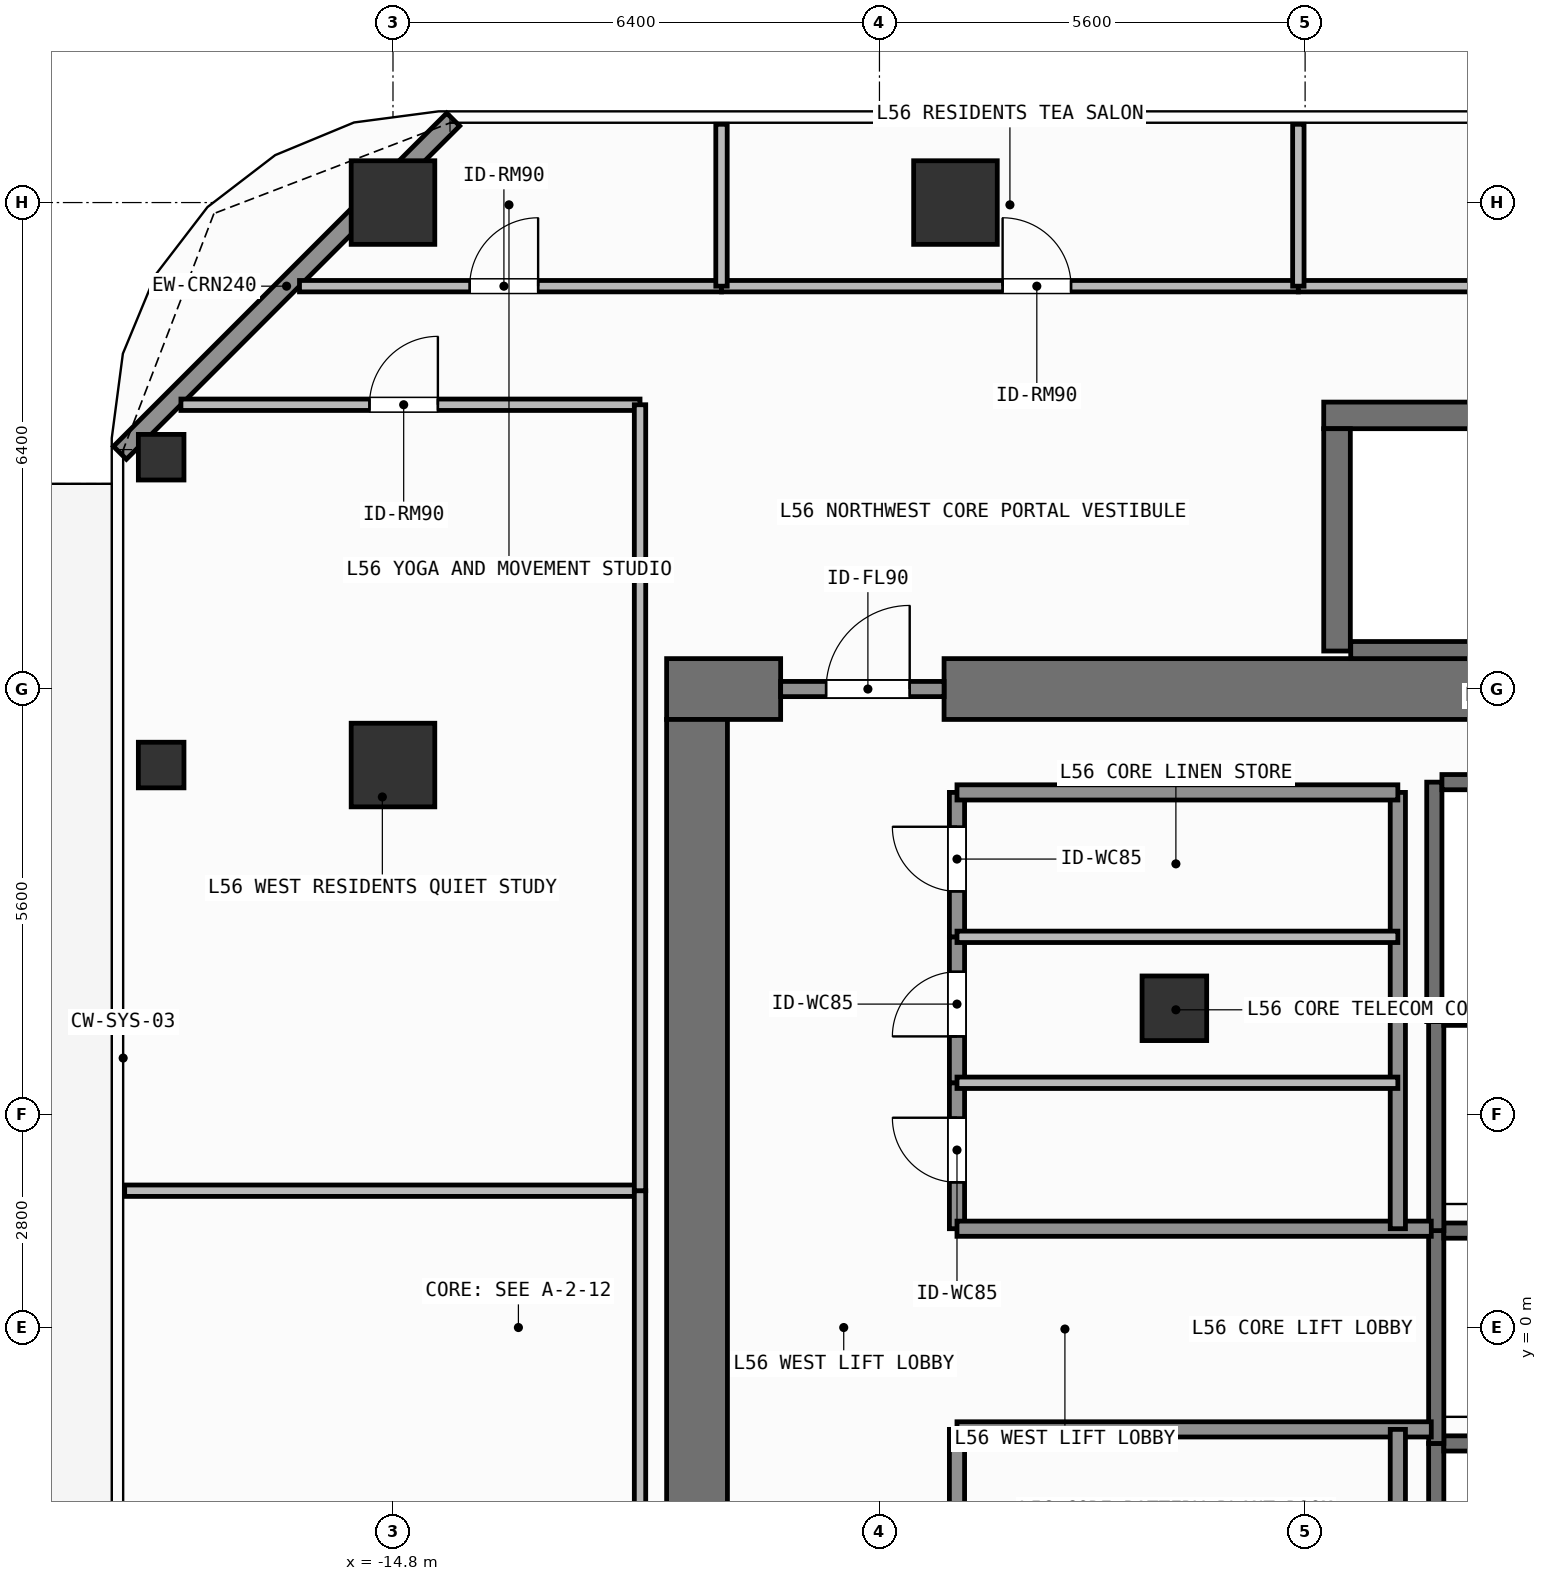
"""IFC4 building model, lengths in metres.
Left out: names, types, materials, properties, quantities, classifications, styles, units other than length and angle.
Written with IfcOpenShell. Run it as: python <this file> out.ifc"""

import sys

from ifc_helpers import new_model, si_unit, direction, frame, frame_2d, origin, origin_2d, place, context, subcontext, project, spatial, rectangle, hollow_rectangle, extrude, element, fill, save


model = new_model("IFC4")
c1 = context("Model", 3, precision=1e-05, world=origin(), true_north=direction((0.0, 1.0)))
c2 = subcontext(c1, "Body", "Model", "MODEL_VIEW")
j1 = project(units=[si_unit("LENGTHUNIT", "METRE"), si_unit("PLANEANGLEUNIT", "RADIAN")], contexts=[c1])
p1 = place(None, origin())
s1 = spatial("IfcSite", under=j1, at=p1, CompositionType="ELEMENT")
p2 = place(p1, origin())
s2 = spatial("IfcBuilding", under=s1, at=p2, CompositionType="ELEMENT")
p3 = place(p2, frame((0.0, 0.0, 227.4)))
s3 = spatial("IfcBuildingStorey", under=s2, at=p3, CompositionType="ELEMENT", Elevation=227.4)
p4 = place(p3, frame((-11.2, 8.4, 0.0), z_axis=(0.0, 0.0, 1.0), x_axis=(1.0, 0.0, 0.0)))
e1 = element("IfcWall", 1, at=p4, inside=s3, PredefinedType="SHEAR", context=c2, shape_type="SweptSolid", body=[
    extrude(rectangle(XDim=1.5, YDim=0.8, at=frame_2d((0.75, 0.0))), origin(), (0.0, 0.0, 1.0), 3.9),
])
p5 = place(p3, frame((-7.55, 8.4, 0.0), z_axis=(0.0, 0.0, 1.0), x_axis=(1.0, 0.0, 0.0)))
e2 = element("IfcWall", 2, at=p5, inside=s3, PredefinedType="SHEAR", context=c2, shape_type="SweptSolid", body=[
    extrude(rectangle(XDim=16.35, YDim=0.8, at=frame_2d((8.175, 0.0))), origin(), (0.0, 0.0, 1.0), 3.9),
])
p6 = place(p3, frame((-10.8, -8.0, 0.0), z_axis=(0.0, 0.0, 1.0), x_axis=(0.0, 1.0, 0.0)))
e3 = element("IfcWall", 3, at=p6, inside=s3, PredefinedType="SHEAR", context=c2, shape_type="SweptSolid", body=[
    extrude(rectangle(XDim=16.0, YDim=0.8, at=frame_2d((8.0, 0.0))), origin(), (0.0, 0.0, 1.0), 3.9),
])
p7 = place(p3, frame((-2.555, 12.0, 0.0), z_axis=(0.0, 0.0, 1.0), x_axis=(1.0, 0.0, 0.0)))
e4 = element("IfcWall", 4, at=p7, inside=s3, PredefinedType="SHEAR", context=c2, shape_type="SweptSolid", body=[
    extrude(rectangle(XDim=7.31, YDim=0.35, at=frame_2d((3.655, 0.0))), origin(), (0.0, 0.0, 1.0), 3.9),
])
p8 = place(p3, frame((-2.2, 8.913, 0.0), z_axis=(0.0, 0.0, 1.0), x_axis=(1.0, 0.0, 0.0)))
e5 = element("IfcWall", 5, at=p8, inside=s3, PredefinedType="SHEAR", context=c2, shape_type="SweptSolid", body=[
    extrude(rectangle(XDim=6.6, YDim=0.225, at=frame_2d((3.3, 0.0))), origin(), (0.0, 0.0, 1.0), 3.9),
])
p9 = place(p3, frame((-2.38, 8.9, 0.0), z_axis=(0.0, 0.0, 1.0), x_axis=(0.0, 1.0, 0.0)))
e6 = element("IfcWall", 6, at=p9, inside=s3, PredefinedType="SHEAR", context=c2, shape_type="SweptSolid", body=[
    extrude(rectangle(XDim=2.925, YDim=0.35, at=frame_2d((1.462, 0.0))), origin(), (0.0, 0.0, 1.0), 3.9),
])
for number, where, z_axis, x_axis in (
    (7, (-14.8, 14.8, 0.0), (0.0, 0.0, 1.0), (1.0, 0.0, 0.0)),
    (8, (-7.4, 14.8, 0.0), (0.0, 0.0, 1.0), (1.0, 0.0, 0.0)),
    (9, (-14.8, 7.4, 0.0), (0.0, 0.0, 1.0), (1.0, 0.0, 0.0)),
):
    element("IfcColumn", number, at=place(p3, frame(where, z_axis=z_axis, x_axis=x_axis)), inside=s3, PredefinedType="COLUMN", context=c2, shape_type="SweptSolid", body=[
        extrude(rectangle(XDim=1.1, YDim=1.1, at=origin_2d()), origin(), (0.0, 0.0, 1.0), 3.9),
    ])
p10 = place(p3, frame((-4.52, 4.2, 0.0), z_axis=(0.0, 0.0, 1.0), x_axis=(1.0, 0.0, 0.0)))
e10 = element("IfcColumn", 10, at=p10, inside=s3, PredefinedType="COLUMN", context=c2, shape_type="SweptSolid", body=[
    extrude(rectangle(XDim=0.85, YDim=0.85, at=origin_2d()), origin(), (0.0, 0.0, 1.0), 3.9),
])
for number, where, z_axis, x_axis in (
    (11, (-17.85, 11.45, 0.0), (0.0, 0.0, 1.0), (1.0, 0.0, 0.0)),
    (12, (-17.85, 7.4, 0.0), (0.0, 0.0, 1.0), (1.0, 0.0, 0.0)),
):
    element("IfcColumn", number, at=place(p3, frame(where, z_axis=z_axis, x_axis=x_axis)), inside=s3, PredefinedType="COLUMN", context=c2, shape_type="SweptSolid", body=[
        extrude(hollow_rectangle(XDim=0.6, YDim=0.6, WallThickness=0.028, at=origin_2d()), origin(), (0.0, 0.0, 1.0), 3.9),
    ])
p11 = place(p3, frame((-18.392, 11.508, 0.0), z_axis=(0.0, 0.0, 1.0), x_axis=(0.707106781187, 0.707106781187, 0.0)))
e13 = element("IfcWall", 13, at=p11, inside=s3, PredefinedType="SOLIDWALL", context=c2, shape_type="SweptSolid", body=[
    extrude(rectangle(XDim=6.201, YDim=0.24, at=frame_2d((3.101, 0.0))), origin(), (0.0, 0.0, 1.0), 3.68),
])
p12 = place(p3, frame((-1.075, -4.275, 0.0), z_axis=(0.0, 0.0, 1.0), x_axis=(0.0, 1.0, 0.0)))
e14 = element("IfcWall", 14, at=p12, inside=s3, PredefinedType="SHEAR", context=c2, shape_type="SweptSolid", body=[
    extrude(rectangle(XDim=2.75, YDim=0.2, at=frame_2d((1.375, 0.0))), origin(), (0.0, 0.0, 1.0), 3.68),
])
p13 = place(p3, frame((-0.975, -1.525, 0.0), z_axis=(0.0, 0.0, 1.0), x_axis=(1.0, 0.0, 0.0)))
e15 = element("IfcWall", 15, at=p13, inside=s3, PredefinedType="SHEAR", context=c2, shape_type="SweptSolid", body=[
    extrude(rectangle(XDim=2.35, YDim=0.2, at=frame_2d((1.175, 0.0))), origin(), (0.0, 0.0, 1.0), 3.68),
])
p14 = place(p3, frame((-1.075, -1.525, 0.0), z_axis=(0.0, 0.0, 1.0), x_axis=(0.0, 1.0, 0.0)))
e16 = element("IfcWall", 16, at=p14, inside=s3, PredefinedType="SHEAR", context=c2, shape_type="SweptSolid", body=[
    extrude(rectangle(XDim=2.8, YDim=0.2, at=frame_2d((1.4, 0.0))), origin(), (0.0, 0.0, 1.0), 3.68),
])
p15 = place(p3, frame((-0.975, 1.275, 0.0), z_axis=(0.0, 0.0, 1.0), x_axis=(1.0, 0.0, 0.0)))
e17 = element("IfcWall", 17, at=p15, inside=s3, PredefinedType="SHEAR", context=c2, shape_type="SweptSolid", body=[
    extrude(rectangle(XDim=2.35, YDim=0.2, at=frame_2d((1.175, 0.0))), origin(), (0.0, 0.0, 1.0), 3.68),
])
p16 = place(p3, frame((-1.075, 1.275, 0.0), z_axis=(0.0, 0.0, 1.0), x_axis=(0.0, 1.0, 0.0)))
e18 = element("IfcWall", 18, at=p16, inside=s3, PredefinedType="SHEAR", context=c2, shape_type="SweptSolid", body=[
    extrude(rectangle(XDim=2.8, YDim=0.2, at=frame_2d((1.4, 0.0))), origin(), (0.0, 0.0, 1.0), 3.68),
])
p17 = place(p3, frame((-0.975, 4.075, 0.0), z_axis=(0.0, 0.0, 1.0), x_axis=(1.0, 0.0, 0.0)))
e19 = element("IfcWall", 19, at=p17, inside=s3, PredefinedType="SHEAR", context=c2, shape_type="SweptSolid", body=[
    extrude(rectangle(XDim=2.35, YDim=0.2, at=frame_2d((1.175, 0.0))), origin(), (0.0, 0.0, 1.0), 3.68),
])
p18 = place(p3, frame((-1.1, 4.025, 0.0), z_axis=(0.0, 0.0, 1.0), x_axis=(0.0, 1.0, 0.0)))
e20 = element("IfcWall", 20, at=p18, inside=s3, PredefinedType="SHEAR", context=c2, shape_type="SweptSolid", body=[
    extrude(rectangle(XDim=3.15, YDim=0.2, at=frame_2d((1.575, 0.0))), origin(), (0.0, 0.0, 1.0), 3.68),
])
p19 = place(p3, frame((-1.0, 7.175, 0.0), z_axis=(0.0, 0.0, 1.0), x_axis=(1.0, 0.0, 0.0)))
e21 = element("IfcWall", 21, at=p19, inside=s3, PredefinedType="SHEAR", context=c2, shape_type="SweptSolid", body=[
    extrude(rectangle(XDim=2.4, YDim=0.2, at=frame_2d((1.2, 0.0))), origin(), (0.0, 0.0, 1.0), 3.68),
])
p20 = place(p3, frame((-9.7, 8.4, 0.0), z_axis=(0.0, 0.0, 1.0), x_axis=(1.0, 0.0, 0.0)))
e22 = element("IfcWall", 22, at=p20, inside=s3, PredefinedType="SOLIDWALL", context=c2, shape_type="SweptSolid", body=[
    extrude(rectangle(XDim=2.15, YDim=0.2, at=frame_2d((1.075, 0.0))), origin(), (0.0, 0.0, 1.0), 2.82),
])
p21 = place(p20, frame((0.598, 0.0, 0.0)))
e23 = element("IfcOpeningElement", 23, at=p21, cuts=e22, PredefinedType="OPENING", context=c2, shape_type="SweptSolid", body=[
    extrude(rectangle(XDim=1.1, YDim=2.15, at=frame_2d((0.55, 1.075))), frame((0.0, 0.11, 0.0), z_axis=(0.0, -1.0, 0.0), x_axis=(1.0, 0.0, 0.0)), (0.0, 0.0, 1.0), 0.22),
])
p22 = place(p3, frame((-7.38, -7.04, 0.0), z_axis=(0.0, 0.0, 1.0), x_axis=(0.0, 1.0, 0.0)))
e24 = element("IfcWall", 24, at=p22, inside=s3, PredefinedType="SOLIDWALL", context=c2, shape_type="SweptSolid", body=[
    extrude(rectangle(XDim=5.7, YDim=0.2, at=frame_2d((2.85, 0.0))), origin(), (0.0, 0.0, 1.0), 3.68),
])
p23 = place(p22, frame((2.301, 0.0, 0.0)))
e25 = element("IfcOpeningElement", 25, at=p23, cuts=e24, PredefinedType="OPENING", context=c2, shape_type="SweptSolid", body=[
    extrude(rectangle(XDim=0.92, YDim=2.1, at=frame_2d((0.46, 1.05))), frame((0.0, 0.11, 0.0), z_axis=(0.0, -1.0, 0.0), x_axis=(1.0, 0.0, 0.0)), (0.0, 0.0, 1.0), 0.22),
])
p24 = place(p3, frame((-7.38, 1.3, 0.0), z_axis=(0.0, 0.0, 1.0), x_axis=(0.0, 1.0, 0.0)))
e26 = element("IfcWall", 26, at=p24, inside=s3, PredefinedType="SOLIDWALL", context=c2, shape_type="SweptSolid", body=[
    extrude(rectangle(XDim=1.92, YDim=0.2, at=frame_2d((0.96, 0.0))), origin(), (0.0, 0.0, 1.0), 3.68),
])
p25 = place(p24, frame((0.61, 0.0, 0.0)))
e27 = element("IfcOpeningElement", 27, at=p25, cuts=e26, PredefinedType="OPENING", context=c2, shape_type="SweptSolid", body=[
    extrude(rectangle(XDim=0.85, YDim=2.1, at=frame_2d((0.425, 1.05))), frame((0.0, 0.11, 0.0), z_axis=(0.0, -1.0, 0.0), x_axis=(1.0, 0.0, 0.0)), (0.0, 0.0, 1.0), 0.22),
])
p26 = place(p3, frame((-7.38, 3.22, 0.0), z_axis=(0.0, 0.0, 1.0), x_axis=(0.0, 1.0, 0.0)))
e28 = element("IfcWall", 28, at=p26, inside=s3, PredefinedType="SOLIDWALL", context=c2, shape_type="SweptSolid", body=[
    extrude(rectangle(XDim=1.92, YDim=0.2, at=frame_2d((0.96, 0.0))), origin(), (0.0, 0.0, 1.0), 3.68),
])
p27 = place(p26, frame((0.61, 0.0, 0.0)))
e29 = element("IfcOpeningElement", 29, at=p27, cuts=e28, PredefinedType="OPENING", context=c2, shape_type="SweptSolid", body=[
    extrude(rectangle(XDim=0.85, YDim=2.1, at=frame_2d((0.425, 1.05))), frame((0.0, 0.11, 0.0), z_axis=(0.0, -1.0, 0.0), x_axis=(1.0, 0.0, 0.0)), (0.0, 0.0, 1.0), 0.22),
])
p28 = place(p3, frame((-7.38, 5.14, 0.0), z_axis=(0.0, 0.0, 1.0), x_axis=(0.0, 1.0, 0.0)))
e30 = element("IfcWall", 30, at=p28, inside=s3, PredefinedType="SOLIDWALL", context=c2, shape_type="SweptSolid", body=[
    extrude(rectangle(XDim=1.9, YDim=0.2, at=frame_2d((0.95, 0.0))), origin(), (0.0, 0.0, 1.0), 3.68),
])
p29 = place(p28, frame((0.598, 0.0, 0.0)))
e31 = element("IfcOpeningElement", 31, at=p29, cuts=e30, PredefinedType="OPENING", context=c2, shape_type="SweptSolid", body=[
    extrude(rectangle(XDim=0.85, YDim=2.1, at=frame_2d((0.425, 1.05))), frame((0.0, 0.11, 0.0), z_axis=(0.0, -1.0, 0.0), x_axis=(1.0, 0.0, 0.0)), (0.0, 0.0, 1.0), 0.22),
])
p30 = place(p3, frame((-16.03, 13.7, 0.0), z_axis=(0.0, 0.0, 1.0), x_axis=(1.0, 0.0, 0.0)))
e32 = element("IfcWall", 32, at=p30, inside=s3, PredefinedType="PARTITIONING", context=c2, shape_type="SweptSolid", body=[
    extrude(rectangle(XDim=5.552, YDim=0.15, at=frame_2d((2.776, 0.0))), origin(), (0.0, 0.0, 1.0), 3.68),
])
p31 = place(p30, frame((2.24, 0.0, 0.0)))
e33 = element("IfcOpeningElement", 33, at=p31, cuts=e32, PredefinedType="OPENING", context=c2, shape_type="SweptSolid", body=[
    extrude(rectangle(XDim=0.9, YDim=2.1, at=frame_2d((0.45, 1.05))), frame((0.0, 0.085, 0.0), z_axis=(0.0, -1.0, 0.0), x_axis=(1.0, 0.0, 0.0)), (0.0, 0.0, 1.0), 0.17),
])
p32 = place(p3, frame((-10.478, 13.7, 0.0), z_axis=(0.0, 0.0, 1.0), x_axis=(1.0, 0.0, 0.0)))
e34 = element("IfcWall", 34, at=p32, inside=s3, PredefinedType="PARTITIONING", context=c2, shape_type="SweptSolid", body=[
    extrude(rectangle(XDim=7.589, YDim=0.15, at=frame_2d((3.794, 0.0))), origin(), (0.0, 0.0, 1.0), 3.68),
])
p33 = place(p32, frame((3.698, 0.0, 0.0)))
e35 = element("IfcOpeningElement", 35, at=p33, cuts=e34, PredefinedType="OPENING", context=c2, shape_type="SweptSolid", body=[
    extrude(rectangle(XDim=0.9, YDim=2.1, at=frame_2d((0.45, 1.05))), frame((0.0, 0.085, 0.0), z_axis=(0.0, -1.0, 0.0), x_axis=(1.0, 0.0, 0.0)), (0.0, 0.0, 1.0), 0.17),
])
p34 = place(p3, frame((-2.889, 13.7, 0.0), z_axis=(0.0, 0.0, 1.0), x_axis=(1.0, 0.0, 0.0)))
e36 = element("IfcWall", 36, at=p34, inside=s3, PredefinedType="PARTITIONING", context=c2, shape_type="SweptSolid", body=[
    extrude(rectangle(XDim=8.387, YDim=0.15, at=frame_2d((4.193, 0.0))), origin(), (0.0, 0.0, 1.0), 3.68),
])
p35 = place(p34, frame((3.743, 0.0, 0.0)))
e37 = element("IfcOpeningElement", 37, at=p35, cuts=e36, PredefinedType="OPENING", context=c2, shape_type="SweptSolid", body=[
    extrude(rectangle(XDim=0.9, YDim=2.1, at=frame_2d((0.45, 1.05))), frame((0.0, 0.085, 0.0), z_axis=(0.0, -1.0, 0.0), x_axis=(1.0, 0.0, 0.0)), (0.0, 0.0, 1.0), 0.17),
])
p36 = place(p3, frame((-17.59, 12.14, 0.0), z_axis=(0.0, 0.0, 1.0), x_axis=(1.0, 0.0, 0.0)))
e38 = element("IfcWall", 38, at=p36, inside=s3, PredefinedType="PARTITIONING", context=c2, shape_type="SweptSolid", body=[
    extrude(rectangle(XDim=6.04, YDim=0.15, at=frame_2d((3.02, 0.0))), origin(), (0.0, 0.0, 1.0), 3.68),
])
p37 = place(p36, frame((2.481, 0.0, 0.0)))
e39 = element("IfcOpeningElement", 39, at=p37, cuts=e38, PredefinedType="OPENING", context=c2, shape_type="SweptSolid", body=[
    extrude(rectangle(XDim=0.9, YDim=2.1, at=frame_2d((0.45, 1.05))), frame((0.0, 0.085, 0.0), z_axis=(0.0, -1.0, 0.0), x_axis=(1.0, 0.0, 0.0)), (0.0, 0.0, 1.0), 0.17),
])
for number, where, z_axis, x_axis in (
    (40, (-7.38, -1.34, 0.0), (0.0, 0.0, 1.0), (1.0, 0.0, 0.0)),
    (41, (-7.38, 1.3, 0.0), (0.0, 0.0, 1.0), (1.0, 0.0, 0.0)),
):
    element("IfcWall", number, at=place(p3, frame(where, z_axis=z_axis, x_axis=x_axis)), inside=s3, PredefinedType="SOLIDWALL", context=c2, shape_type="SweptSolid", body=[
        extrude(rectangle(XDim=6.24, YDim=0.2, at=frame_2d((3.12, 0.0))), origin(), (0.0, 0.0, 1.0), 3.68),
    ])
p38 = place(p3, frame((-1.58, -7.04, 0.0), z_axis=(0.0, 0.0, 1.0), x_axis=(0.0, 1.0, 0.0)))
e42 = element("IfcWall", 42, at=p38, inside=s3, PredefinedType="SOLIDWALL", context=c2, shape_type="SweptSolid", body=[
    extrude(rectangle(XDim=5.7, YDim=0.2, at=frame_2d((2.85, 0.0))), origin(), (0.0, 0.0, 1.0), 3.68),
])
p39 = place(p3, frame((-1.58, 1.3, 0.0), z_axis=(0.0, 0.0, 1.0), x_axis=(0.0, 1.0, 0.0)))
e43 = element("IfcWall", 43, at=p39, inside=s3, PredefinedType="SOLIDWALL", context=c2, shape_type="SweptSolid", body=[
    extrude(rectangle(XDim=5.74, YDim=0.2, at=frame_2d((2.87, 0.0))), origin(), (0.0, 0.0, 1.0), 3.68),
])
p40 = place(p3, frame((-7.38, 7.04, 0.0), z_axis=(0.0, 0.0, 1.0), x_axis=(1.0, 0.0, 0.0)))
e44 = element("IfcWall", 44, at=p40, inside=s3, PredefinedType="SOLIDWALL", context=c2, shape_type="SweptSolid", body=[
    extrude(rectangle(XDim=5.8, YDim=0.2, at=frame_2d((2.9, 0.0))), origin(), (0.0, 0.0, 1.0), 3.68),
])
for number, where, z_axis, x_axis in (
    (45, (-7.38, 3.22, 0.0), (0.0, 0.0, 1.0), (1.0, 0.0, 0.0)),
    (46, (-7.38, 5.14, 0.0), (0.0, 0.0, 1.0), (1.0, 0.0, 0.0)),
):
    element("IfcWall", number, at=place(p3, frame(where, z_axis=z_axis, x_axis=x_axis)), inside=s3, PredefinedType="PARTITIONING", context=c2, shape_type="SweptSolid", body=[
        extrude(rectangle(XDim=5.8, YDim=0.15, at=frame_2d((2.9, 0.0))), origin(), (0.0, 0.0, 1.0), 3.68),
    ])
for number, where, z_axis, x_axis in (
    (47, (-10.478, 13.7, 0.0), (0.0, 0.0, 1.0), (0.0, 1.0, 0.0)),
    (48, (-2.889, 13.7, 0.0), (0.0, 0.0, 1.0), (0.0, 1.0, 0.0)),
):
    element("IfcWall", number, at=place(p3, frame(where, z_axis=z_axis, x_axis=x_axis)), inside=s3, PredefinedType="PARTITIONING", context=c2, shape_type="SweptSolid", body=[
        extrude(rectangle(XDim=2.13, YDim=0.15, at=frame_2d((1.065, 0.0))), origin(), (0.0, 0.0, 1.0), 3.68),
    ])
p41 = place(p3, frame((-18.33, 1.8, 0.0), z_axis=(0.0, 0.0, 1.0), x_axis=(1.0, 0.0, 0.0)))
e49 = element("IfcWall", 49, at=p41, inside=s3, PredefinedType="PARTITIONING", context=c2, shape_type="SweptSolid", body=[
    extrude(rectangle(XDim=6.78, YDim=0.15, at=frame_2d((3.39, 0.0))), origin(), (0.0, 0.0, 1.0), 3.68),
])
p42 = place(p3, frame((-11.55, -12.14, 0.0), z_axis=(0.0, 0.0, 1.0), x_axis=(0.0, 1.0, 0.0)))
e50 = element("IfcWall", 50, at=p42, inside=s3, PredefinedType="PARTITIONING", context=c2, shape_type="SweptSolid", body=[
    extrude(rectangle(XDim=13.94, YDim=0.15, at=frame_2d((6.97, 0.0))), origin(), (0.0, 0.0, 1.0), 3.68),
])
p43 = place(p3, frame((-11.55, 1.8, 0.0), z_axis=(0.0, 0.0, 1.0), x_axis=(0.0, 1.0, 0.0)))
e51 = element("IfcWall", 51, at=p43, inside=s3, PredefinedType="PARTITIONING", context=c2, shape_type="SweptSolid", body=[
    extrude(rectangle(XDim=10.34, YDim=0.15, at=frame_2d((5.17, 0.0))), origin(), (0.0, 0.0, 1.0), 3.68),
])
p44 = place(p21, origin())
e52 = element("IfcDoor", 52, at=p44, inside=s3, OperationType="SINGLE_SWING_RIGHT", PredefinedType="DOOR", context=c2, shape_type="SweptSolid", body=[
    extrude(rectangle(XDim=1.1, YDim=2.15, at=frame_2d((0.55, 1.075))), frame((0.0, 0.025, 0.0), z_axis=(0.0, -1.0, 0.0), x_axis=(1.0, 0.0, 0.0)), (0.0, 0.0, 1.0), 0.05),
])
fill(e23, e52)
p45 = place(p25, origin())
e53 = element("IfcDoor", 53, at=p45, inside=s3, OperationType="SINGLE_SWING_RIGHT", PredefinedType="DOOR", context=c2, shape_type="SweptSolid", body=[
    extrude(rectangle(XDim=0.85, YDim=2.1, at=frame_2d((0.425, 1.05))), frame((0.0, 0.025, 0.0), z_axis=(0.0, -1.0, 0.0), x_axis=(1.0, 0.0, 0.0)), (0.0, 0.0, 1.0), 0.05),
])
fill(e27, e53)
p46 = place(p27, origin())
e54 = element("IfcDoor", 54, at=p46, inside=s3, OperationType="SINGLE_SWING_LEFT", PredefinedType="DOOR", context=c2, shape_type="SweptSolid", body=[
    extrude(rectangle(XDim=0.85, YDim=2.1, at=frame_2d((0.425, 1.05))), frame((0.0, 0.025, 0.0), z_axis=(0.0, -1.0, 0.0), x_axis=(1.0, 0.0, 0.0)), (0.0, 0.0, 1.0), 0.05),
])
fill(e29, e54)
p47 = place(p29, origin())
e55 = element("IfcDoor", 55, at=p47, inside=s3, OperationType="SINGLE_SWING_RIGHT", PredefinedType="DOOR", context=c2, shape_type="SweptSolid", body=[
    extrude(rectangle(XDim=0.85, YDim=2.1, at=frame_2d((0.425, 1.05))), frame((0.0, 0.025, 0.0), z_axis=(0.0, -1.0, 0.0), x_axis=(1.0, 0.0, 0.0)), (0.0, 0.0, 1.0), 0.05),
])
fill(e31, e55)
p48 = place(p31, origin())
e56 = element("IfcDoor", 56, at=p48, inside=s3, OperationType="SINGLE_SWING_RIGHT", PredefinedType="DOOR", context=c2, shape_type="SweptSolid", body=[
    extrude(rectangle(XDim=0.9, YDim=2.1, at=frame_2d((0.45, 1.05))), frame((0.0, 0.025, 0.0), z_axis=(0.0, -1.0, 0.0), x_axis=(1.0, 0.0, 0.0)), (0.0, 0.0, 1.0), 0.05),
])
fill(e33, e56)
p49 = place(p33, origin())
e57 = element("IfcDoor", 57, at=p49, inside=s3, OperationType="SINGLE_SWING_LEFT", PredefinedType="DOOR", context=c2, shape_type="SweptSolid", body=[
    extrude(rectangle(XDim=0.9, YDim=2.1, at=frame_2d((0.45, 1.05))), frame((0.0, 0.025, 0.0), z_axis=(0.0, -1.0, 0.0), x_axis=(1.0, 0.0, 0.0)), (0.0, 0.0, 1.0), 0.05),
])
fill(e35, e57)
p50 = place(p37, origin())
e58 = element("IfcDoor", 58, at=p50, inside=s3, OperationType="SINGLE_SWING_RIGHT", PredefinedType="DOOR", context=c2, shape_type="SweptSolid", body=[
    extrude(rectangle(XDim=0.9, YDim=2.1, at=frame_2d((0.45, 1.05))), frame((0.0, 0.025, 0.0), z_axis=(0.0, -1.0, 0.0), x_axis=(1.0, 0.0, 0.0)), (0.0, 0.0, 1.0), 0.05),
])
fill(e39, e58)
save(model, sys.argv[1])
